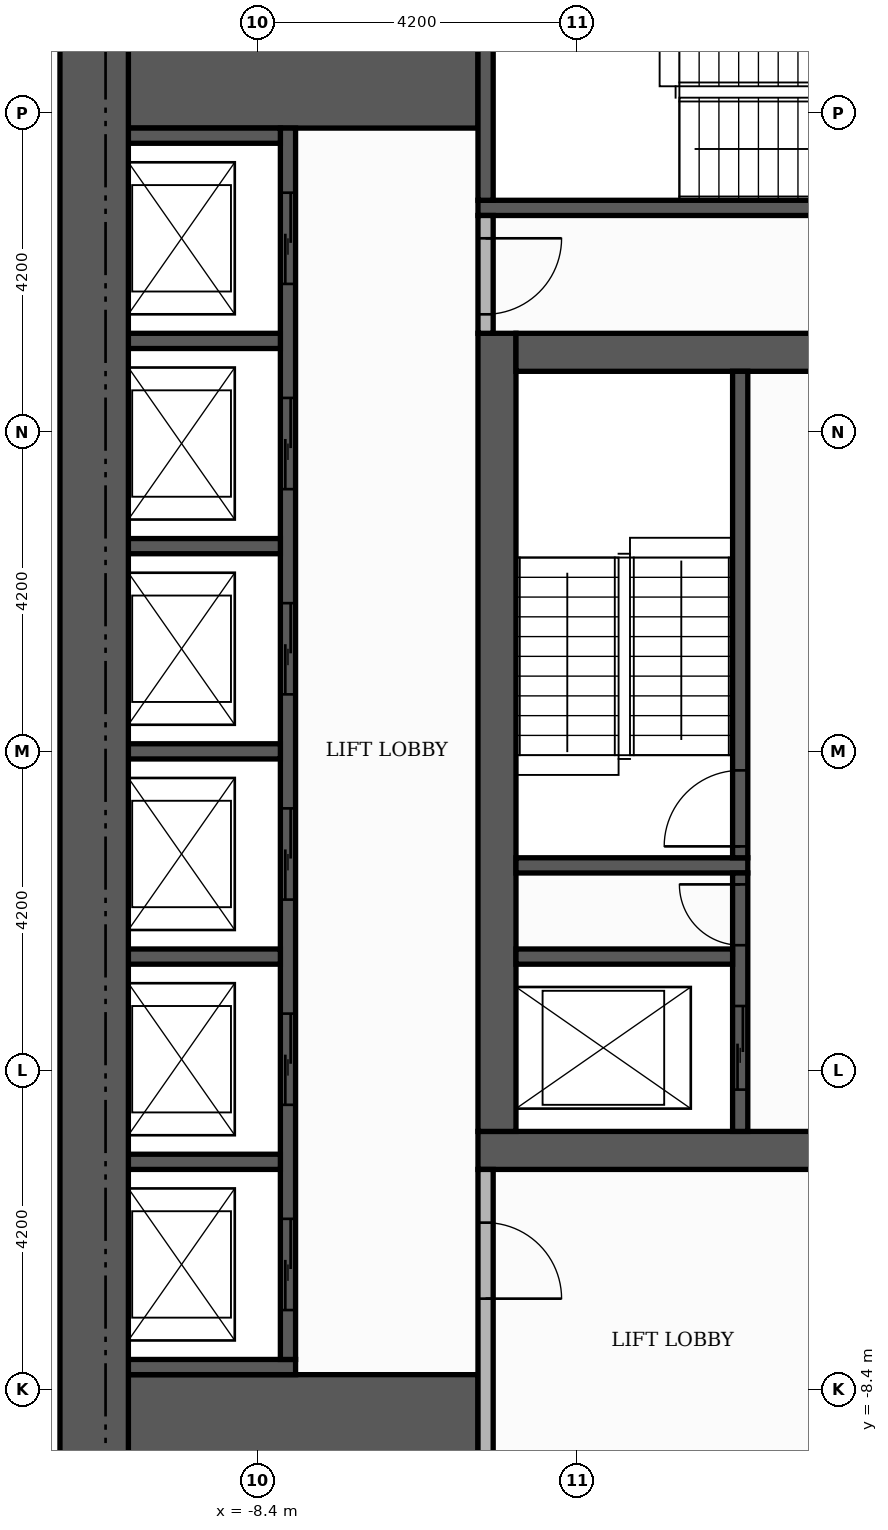
"""IFC4 building model, lengths in metres.
Left out: names, types, materials, properties, quantities, classifications, styles, units other than length and angle.
Written with IfcOpenShell. Run it as: python <this file> out.ifc"""

import sys

from ifc_helpers import new_model, si_unit, direction, frame, frame_2d, origin, place, context, subcontext, project, spatial, rectangle, extrude, element, fill, save


model = new_model("IFC4")
c1 = context("Model", 3, precision=1e-05, world=origin(), true_north=direction((0.0, 1.0)))
c2 = subcontext(c1, "Body", "Model", "MODEL_VIEW")
j1 = project(units=[si_unit("LENGTHUNIT", "METRE"), si_unit("PLANEANGLEUNIT", "RADIAN")], contexts=[c1])
p1 = place(None, origin())
s1 = spatial("IfcSite", under=j1, at=p1, CompositionType="ELEMENT")
p2 = place(p1, origin())
s2 = spatial("IfcBuilding", under=s1, at=p2, CompositionType="ELEMENT")
p3 = place(p2, frame((0.0, 0.0, 114.3)))
s3 = spatial("IfcBuildingStorey", under=s2, at=p3, CompositionType="ELEMENT", Elevation=114.3)
p4 = place(p3, frame((-5.5, -5.25, 0.0), z_axis=(0.0, 0.0, 1.0), x_axis=(1.0, 0.0, 0.0)))
e1 = element("IfcWall", 1, at=p4, inside=s3, PredefinedType="SHEAR", context=c2, shape_type="SweptSolid", body=[
    extrude(rectangle(XDim=11.0, YDim=0.5, at=frame_2d((5.5, 0.0))), origin(), (0.0, 0.0, 1.0), 3.48),
])
p5 = place(p4, frame((4.9, 0.0, 0.0)))
e2 = element("IfcOpeningElement", 2, at=p5, cuts=e1, PredefinedType="OPENING", context=c2, shape_type="SweptSolid", body=[
    extrude(rectangle(XDim=1.2, YDim=2.1, at=frame_2d((0.6, 1.05))), frame((0.0, 0.26, 0.0), z_axis=(0.0, -1.0, 0.0), x_axis=(1.0, 0.0, 0.0)), (0.0, 0.0, 1.0), 0.52),
])
p6 = place(p3, frame((-5.25, -5.0, 0.0), z_axis=(0.0, 0.0, 1.0), x_axis=(0.0, 1.0, 0.0)))
e3 = element("IfcWall", 3, at=p6, inside=s3, PredefinedType="SHEAR", context=c2, shape_type="SweptSolid", body=[
    extrude(rectangle(XDim=10.5, YDim=0.5, at=frame_2d((5.25, 0.0))), origin(), (0.0, 0.0, 1.0), 3.48),
])
p7 = place(p3, frame((-5.0, 5.25, 0.0), z_axis=(0.0, 0.0, 1.0), x_axis=(1.0, 0.0, 0.0)))
e4 = element("IfcWall", 4, at=p7, inside=s3, PredefinedType="SHEAR", context=c2, shape_type="SweptSolid", body=[
    extrude(rectangle(XDim=10.0, YDim=0.5, at=frame_2d((5.0, 0.0))), origin(), (0.0, 0.0, 1.0), 3.48),
])
p8 = place(p7, frame((4.4, 0.0, 0.0)))
e5 = element("IfcOpeningElement", 5, at=p8, cuts=e4, PredefinedType="OPENING", context=c2, shape_type="SweptSolid", body=[
    extrude(rectangle(XDim=1.2, YDim=2.1, at=frame_2d((0.6, 1.05))), frame((0.0, 0.26, 0.0), z_axis=(0.0, -1.0, 0.0), x_axis=(1.0, 0.0, 0.0)), (0.0, 0.0, 1.0), 0.52),
])
for number, where, z_axis, x_axis in (
    (6, (-10.1, -9.15, 0.0), (0.0, 0.0, 1.0), (1.0, 0.0, 0.0)),
    (7, (-10.1, 9.15, 0.0), (0.0, 0.0, 1.0), (1.0, 0.0, 0.0)),
):
    element("IfcWall", number, at=place(p3, frame(where, z_axis=z_axis, x_axis=x_axis)), inside=s3, PredefinedType="SHEAR", context=c2, shape_type="SweptSolid", body=[
        extrude(rectangle(XDim=4.6, YDim=1.9, at=frame_2d((2.3, 0.0))), origin(), (0.0, 0.0, 1.0), 3.48),
    ])
p9 = place(p3, frame((-5.0, -1.5, 0.0), z_axis=(0.0, 0.0, 1.0), x_axis=(1.0, 0.0, 0.0)))
e8 = element("IfcWall", 8, at=p9, inside=s3, PredefinedType="SHEAR", context=c2, shape_type="SweptSolid", body=[
    extrude(rectangle(XDim=3.05, YDim=0.2, at=frame_2d((1.525, 0.0))), origin(), (0.0, 0.0, 1.0), 3.48),
])
p10 = place(p3, frame((-2.05, -1.4, 0.0), z_axis=(0.0, 0.0, 1.0), x_axis=(0.0, 1.0, 0.0)))
e9 = element("IfcWall", 9, at=p10, inside=s3, PredefinedType="SHEAR", context=c2, shape_type="SweptSolid", body=[
    extrude(rectangle(XDim=6.4, YDim=0.2, at=frame_2d((3.2, 0.0))), origin(), (0.0, 0.0, 1.0), 3.48),
])
p11 = place(p10, frame((0.15, 0.0, 0.0)))
e10 = element("IfcOpeningElement", 10, at=p11, cuts=e9, PredefinedType="OPENING", context=c2, shape_type="SweptSolid", body=[
    extrude(rectangle(XDim=1.0, YDim=2.1, at=frame_2d((0.5, 1.05))), frame((0.0, 0.11, 0.0), z_axis=(0.0, -1.0, 0.0), x_axis=(1.0, 0.0, 0.0)), (0.0, 0.0, 1.0), 0.22),
])
p12 = place(p3, frame((-5.5, 7.15, 0.0), z_axis=(0.0, 0.0, 1.0), x_axis=(1.0, 0.0, 0.0)))
e11 = element("IfcWall", 11, at=p12, inside=s3, PredefinedType="SHEAR", context=c2, shape_type="SweptSolid", body=[
    extrude(rectangle(XDim=6.8, YDim=0.2, at=frame_2d((3.4, 0.0))), origin(), (0.0, 0.0, 1.0), 3.48),
])
p13 = place(p3, frame((-5.4, 7.25, 0.0), z_axis=(0.0, 0.0, 1.0), x_axis=(0.0, 1.0, 0.0)))
e12 = element("IfcWall", 12, at=p13, inside=s3, PredefinedType="SHEAR", context=c2, shape_type="SweptSolid", body=[
    extrude(rectangle(XDim=2.85, YDim=0.2, at=frame_2d((1.425, 0.0))), origin(), (0.0, 0.0, 1.0), 3.48),
])
p14 = place(p3, frame((-10.1, -8.1, 0.0), z_axis=(0.0, 0.0, 1.0), x_axis=(1.0, 0.0, 0.0)))
e13 = element("IfcWall", 13, at=p14, inside=s3, PredefinedType="SHEAR", context=c2, shape_type="SweptSolid", body=[
    extrude(rectangle(XDim=2.2, YDim=0.2, at=frame_2d((1.1, 0.0))), origin(), (0.0, 0.0, 1.0), 3.48),
])
p15 = place(p3, frame((-8.0, -8.0, 0.0), z_axis=(0.0, 0.0, 1.0), x_axis=(0.0, 1.0, 0.0)))
e14 = element("IfcWall", 14, at=p15, inside=s3, PredefinedType="SHEAR", context=c2, shape_type="SweptSolid", body=[
    extrude(rectangle(XDim=16.2, YDim=0.2, at=frame_2d((8.1, 0.0))), origin(), (0.0, 0.0, 1.0), 3.48),
])
p16 = place(p15, frame((0.65, 0.0, 0.0)))
e15 = element("IfcOpeningElement", 15, at=p16, cuts=e14, PredefinedType="OPENING", context=c2, shape_type="SweptSolid", body=[
    extrude(rectangle(XDim=1.2, YDim=2.1, at=frame_2d((0.6, 1.05))), frame((0.0, 0.11, 0.0), z_axis=(0.0, -1.0, 0.0), x_axis=(1.0, 0.0, 0.0)), (0.0, 0.0, 1.0), 0.22),
])
p17 = place(p15, frame((3.35, 0.0, 0.0)))
e16 = element("IfcOpeningElement", 16, at=p17, cuts=e14, PredefinedType="OPENING", context=c2, shape_type="SweptSolid", body=[
    extrude(rectangle(XDim=1.2, YDim=2.1, at=frame_2d((0.6, 1.05))), frame((0.0, 0.11, 0.0), z_axis=(0.0, -1.0, 0.0), x_axis=(1.0, 0.0, 0.0)), (0.0, 0.0, 1.0), 0.22),
])
p18 = place(p15, frame((6.05, 0.0, 0.0)))
e17 = element("IfcOpeningElement", 17, at=p18, cuts=e14, PredefinedType="OPENING", context=c2, shape_type="SweptSolid", body=[
    extrude(rectangle(XDim=1.2, YDim=2.1, at=frame_2d((0.6, 1.05))), frame((0.0, 0.11, 0.0), z_axis=(0.0, -1.0, 0.0), x_axis=(1.0, 0.0, 0.0)), (0.0, 0.0, 1.0), 0.22),
])
p19 = place(p15, frame((8.75, 0.0, 0.0)))
e18 = element("IfcOpeningElement", 18, at=p19, cuts=e14, PredefinedType="OPENING", context=c2, shape_type="SweptSolid", body=[
    extrude(rectangle(XDim=1.2, YDim=2.1, at=frame_2d((0.6, 1.05))), frame((0.0, 0.11, 0.0), z_axis=(0.0, -1.0, 0.0), x_axis=(1.0, 0.0, 0.0)), (0.0, 0.0, 1.0), 0.22),
])
p20 = place(p15, frame((11.45, 0.0, 0.0)))
e19 = element("IfcOpeningElement", 19, at=p20, cuts=e14, PredefinedType="OPENING", context=c2, shape_type="SweptSolid", body=[
    extrude(rectangle(XDim=1.2, YDim=2.1, at=frame_2d((0.6, 1.05))), frame((0.0, 0.11, 0.0), z_axis=(0.0, -1.0, 0.0), x_axis=(1.0, 0.0, 0.0)), (0.0, 0.0, 1.0), 0.22),
])
p21 = place(p15, frame((14.15, 0.0, 0.0)))
e20 = element("IfcOpeningElement", 20, at=p21, cuts=e14, PredefinedType="OPENING", context=c2, shape_type="SweptSolid", body=[
    extrude(rectangle(XDim=1.2, YDim=2.1, at=frame_2d((0.6, 1.05))), frame((0.0, 0.11, 0.0), z_axis=(0.0, -1.0, 0.0), x_axis=(1.0, 0.0, 0.0)), (0.0, 0.0, 1.0), 0.22),
])
p22 = place(p3, frame((-10.1, -5.4, 0.0), z_axis=(0.0, 0.0, 1.0), x_axis=(1.0, 0.0, 0.0)))
e21 = element("IfcWall", 21, at=p22, inside=s3, PredefinedType="SHEAR", context=c2, shape_type="SweptSolid", body=[
    extrude(rectangle(XDim=2.0, YDim=0.2, at=frame_2d((1.0, 0.0))), origin(), (0.0, 0.0, 1.0), 3.48),
])
p23 = place(p3, frame((-2.05, -5.0, 0.0), z_axis=(0.0, 0.0, 1.0), x_axis=(0.0, 1.0, 0.0)))
e22 = element("IfcWall", 22, at=p23, inside=s3, PredefinedType="SHEAR", context=c2, shape_type="SweptSolid", body=[
    extrude(rectangle(XDim=3.4, YDim=0.2, at=frame_2d((1.7, 0.0))), origin(), (0.0, 0.0, 1.0), 3.48),
])
p24 = place(p23, frame((0.55, 0.0, 0.0)))
e23 = element("IfcOpeningElement", 23, at=p24, cuts=e22, PredefinedType="OPENING", context=c2, shape_type="SweptSolid", body=[
    extrude(rectangle(XDim=1.1, YDim=2.1, at=frame_2d((0.55, 1.05))), frame((0.0, 0.11, 0.0), z_axis=(0.0, -1.0, 0.0), x_axis=(1.0, 0.0, 0.0)), (0.0, 0.0, 1.0), 0.22),
])
p25 = place(p23, frame((2.45, 0.0, 0.0)))
e24 = element("IfcOpeningElement", 24, at=p25, cuts=e22, PredefinedType="OPENING", context=c2, shape_type="SweptSolid", body=[
    extrude(rectangle(XDim=0.8, YDim=2.1, at=frame_2d((0.4, 1.05))), frame((0.0, 0.11, 0.0), z_axis=(0.0, -1.0, 0.0), x_axis=(1.0, 0.0, 0.0)), (0.0, 0.0, 1.0), 0.22),
])
p26 = place(p3, frame((-10.1, -2.7, 0.0), z_axis=(0.0, 0.0, 1.0), x_axis=(1.0, 0.0, 0.0)))
e25 = element("IfcWall", 25, at=p26, inside=s3, PredefinedType="SHEAR", context=c2, shape_type="SweptSolid", body=[
    extrude(rectangle(XDim=2.0, YDim=0.2, at=frame_2d((1.0, 0.0))), origin(), (0.0, 0.0, 1.0), 3.48),
])
p27 = place(p3, frame((-5.0, -2.7, 0.0), z_axis=(0.0, 0.0, 1.0), x_axis=(1.0, 0.0, 0.0)))
e26 = element("IfcWall", 26, at=p27, inside=s3, PredefinedType="SHEAR", context=c2, shape_type="SweptSolid", body=[
    extrude(rectangle(XDim=2.85, YDim=0.2, at=frame_2d((1.425, 0.0))), origin(), (0.0, 0.0, 1.0), 3.48),
])
for number, where, z_axis, x_axis in (
    (27, (-10.1, 0.0, 0.0), (0.0, 0.0, 1.0), (1.0, 0.0, 0.0)),
    (28, (-10.1, 2.7, 0.0), (0.0, 0.0, 1.0), (1.0, 0.0, 0.0)),
    (29, (-10.1, 5.4, 0.0), (0.0, 0.0, 1.0), (1.0, 0.0, 0.0)),
    (30, (-10.1, 8.1, 0.0), (0.0, 0.0, 1.0), (1.0, 0.0, 0.0)),
):
    element("IfcWall", number, at=place(p3, frame(where, z_axis=z_axis, x_axis=x_axis)), inside=s3, PredefinedType="SHEAR", context=c2, shape_type="SweptSolid", body=[
        extrude(rectangle(XDim=2.0, YDim=0.2, at=frame_2d((1.0, 0.0))), origin(), (0.0, 0.0, 1.0), 3.48),
    ])
p28 = place(p3, frame((-10.55, -10.1, 0.0), z_axis=(0.0, 0.0, 1.0), x_axis=(0.0, 1.0, 0.0)))
e31 = element("IfcWall", 31, at=p28, inside=s3, PredefinedType="SHEAR", context=c2, shape_type="SweptSolid", body=[
    extrude(rectangle(XDim=20.2, YDim=0.9, at=frame_2d((10.1, 0.0))), origin(), (0.0, 0.0, 1.0), 3.48),
])
p29 = place(p3, frame((-5.4, -10.1, 0.0), z_axis=(0.0, 0.0, 1.0), x_axis=(0.0, 1.0, 0.0)))
e32 = element("IfcWall", 32, at=p29, inside=s3, PredefinedType="PARTITIONING", context=c2, shape_type="SweptSolid", body=[
    extrude(rectangle(XDim=4.6, YDim=0.2, at=frame_2d((2.3, 0.0))), origin(), (0.0, 0.0, 1.0), 3.48),
])
p30 = place(p29, frame((2.9, 0.0, 0.0)))
e33 = element("IfcOpeningElement", 33, at=p30, cuts=e32, PredefinedType="OPENING", context=c2, shape_type="SweptSolid", body=[
    extrude(rectangle(XDim=1.0, YDim=2.1, at=frame_2d((0.5, 1.05))), frame((0.0, 0.11, 0.0), z_axis=(0.0, -1.0, 0.0), x_axis=(1.0, 0.0, 0.0)), (0.0, 0.0, 1.0), 0.22),
])
p31 = place(p3, frame((-5.4, 5.5, 0.0), z_axis=(0.0, 0.0, 1.0), x_axis=(0.0, 1.0, 0.0)))
e34 = element("IfcWall", 34, at=p31, inside=s3, PredefinedType="PARTITIONING", context=c2, shape_type="SweptSolid", body=[
    extrude(rectangle(XDim=1.55, YDim=0.2, at=frame_2d((0.775, 0.0))), origin(), (0.0, 0.0, 1.0), 3.48),
])
p32 = place(p31, frame((0.25, 0.0, 0.0)))
e35 = element("IfcOpeningElement", 35, at=p32, cuts=e34, PredefinedType="OPENING", context=c2, shape_type="SweptSolid", body=[
    extrude(rectangle(XDim=1.0, YDim=2.1, at=frame_2d((0.5, 1.05))), frame((0.0, 0.11, 0.0), z_axis=(0.0, -1.0, 0.0), x_axis=(1.0, 0.0, 0.0)), (0.0, 0.0, 1.0), 0.22),
])
p33 = place(p16, origin())
e36 = element("IfcDoor", 36, at=p33, inside=s3, OperationType="SLIDING_TO_LEFT", PredefinedType="DOOR", context=c2, shape_type="SweptSolid", body=[
    extrude(rectangle(XDim=1.2, YDim=2.1, at=frame_2d((0.6, 1.05))), frame((0.0, 0.025, 0.0), z_axis=(0.0, -1.0, 0.0), x_axis=(1.0, 0.0, 0.0)), (0.0, 0.0, 1.0), 0.05),
])
fill(e15, e36)
p34 = place(p17, origin())
e37 = element("IfcDoor", 37, at=p34, inside=s3, OperationType="SLIDING_TO_LEFT", PredefinedType="DOOR", context=c2, shape_type="SweptSolid", body=[
    extrude(rectangle(XDim=1.2, YDim=2.1, at=frame_2d((0.6, 1.05))), frame((0.0, 0.025, 0.0), z_axis=(0.0, -1.0, 0.0), x_axis=(1.0, 0.0, 0.0)), (0.0, 0.0, 1.0), 0.05),
])
fill(e16, e37)
p35 = place(p18, origin())
e38 = element("IfcDoor", 38, at=p35, inside=s3, OperationType="SLIDING_TO_LEFT", PredefinedType="DOOR", context=c2, shape_type="SweptSolid", body=[
    extrude(rectangle(XDim=1.2, YDim=2.1, at=frame_2d((0.6, 1.05))), frame((0.0, 0.025, 0.0), z_axis=(0.0, -1.0, 0.0), x_axis=(1.0, 0.0, 0.0)), (0.0, 0.0, 1.0), 0.05),
])
fill(e17, e38)
p36 = place(p19, origin())
e39 = element("IfcDoor", 39, at=p36, inside=s3, OperationType="SLIDING_TO_LEFT", PredefinedType="DOOR", context=c2, shape_type="SweptSolid", body=[
    extrude(rectangle(XDim=1.2, YDim=2.1, at=frame_2d((0.6, 1.05))), frame((0.0, 0.025, 0.0), z_axis=(0.0, -1.0, 0.0), x_axis=(1.0, 0.0, 0.0)), (0.0, 0.0, 1.0), 0.05),
])
fill(e18, e39)
p37 = place(p20, origin())
e40 = element("IfcDoor", 40, at=p37, inside=s3, OperationType="SLIDING_TO_LEFT", PredefinedType="DOOR", context=c2, shape_type="SweptSolid", body=[
    extrude(rectangle(XDim=1.2, YDim=2.1, at=frame_2d((0.6, 1.05))), frame((0.0, 0.025, 0.0), z_axis=(0.0, -1.0, 0.0), x_axis=(1.0, 0.0, 0.0)), (0.0, 0.0, 1.0), 0.05),
])
fill(e19, e40)
p38 = place(p21, origin())
e41 = element("IfcDoor", 41, at=p38, inside=s3, OperationType="SLIDING_TO_LEFT", PredefinedType="DOOR", context=c2, shape_type="SweptSolid", body=[
    extrude(rectangle(XDim=1.2, YDim=2.1, at=frame_2d((0.6, 1.05))), frame((0.0, 0.025, 0.0), z_axis=(0.0, -1.0, 0.0), x_axis=(1.0, 0.0, 0.0)), (0.0, 0.0, 1.0), 0.05),
])
fill(e20, e41)
p39 = place(p24, origin())
e42 = element("IfcDoor", 42, at=p39, inside=s3, OperationType="SLIDING_TO_LEFT", PredefinedType="DOOR", context=c2, shape_type="SweptSolid", body=[
    extrude(rectangle(XDim=1.1, YDim=2.1, at=frame_2d((0.55, 1.05))), frame((0.0, 0.025, 0.0), z_axis=(0.0, -1.0, 0.0), x_axis=(1.0, 0.0, 0.0)), (0.0, 0.0, 1.0), 0.05),
])
fill(e23, e42)
p40 = place(p11, origin())
e43 = element("IfcDoor", 43, at=p40, inside=s3, OperationType="SINGLE_SWING_LEFT", PredefinedType="DOOR", context=c2, shape_type="SweptSolid", body=[
    extrude(rectangle(XDim=1.0, YDim=2.1, at=frame_2d((0.5, 1.05))), frame((0.0, 0.025, 0.0), z_axis=(0.0, -1.0, 0.0), x_axis=(1.0, 0.0, 0.0)), (0.0, 0.0, 1.0), 0.05),
])
fill(e10, e43)
p41 = place(p25, origin())
e44 = element("IfcDoor", 44, at=p41, inside=s3, OperationType="SINGLE_SWING_RIGHT", PredefinedType="DOOR", context=c2, shape_type="SweptSolid", body=[
    extrude(rectangle(XDim=0.8, YDim=2.1, at=frame_2d((0.4, 1.05))), frame((0.0, 0.025, 0.0), z_axis=(0.0, -1.0, 0.0), x_axis=(1.0, 0.0, 0.0)), (0.0, 0.0, 1.0), 0.05),
])
fill(e24, e44)
p42 = place(p32, frame((1.0, 0.0, 0.0), z_axis=(0.0, 0.0, 1.0), x_axis=(-1.0, 0.0, 0.0)))
e45 = element("IfcDoor", 45, at=p42, inside=s3, OperationType="SINGLE_SWING_RIGHT", PredefinedType="DOOR", context=c2, shape_type="SweptSolid", body=[
    extrude(rectangle(XDim=1.0, YDim=2.1, at=frame_2d((0.5, 1.05))), frame((0.0, 0.025, 0.0), z_axis=(0.0, -1.0, 0.0), x_axis=(1.0, 0.0, 0.0)), (0.0, 0.0, 1.0), 0.05),
])
fill(e35, e45)
p43 = place(p30, frame((1.0, 0.0, 0.0), z_axis=(0.0, 0.0, 1.0), x_axis=(-1.0, 0.0, 0.0)))
e46 = element("IfcDoor", 46, at=p43, inside=s3, OperationType="SINGLE_SWING_LEFT", PredefinedType="DOOR", context=c2, shape_type="SweptSolid", body=[
    extrude(rectangle(XDim=1.0, YDim=2.1, at=frame_2d((0.5, 1.05))), frame((0.0, 0.025, 0.0), z_axis=(0.0, -1.0, 0.0), x_axis=(1.0, 0.0, 0.0)), (0.0, 0.0, 1.0), 0.05),
])
fill(e33, e46)
save(model, sys.argv[1])
